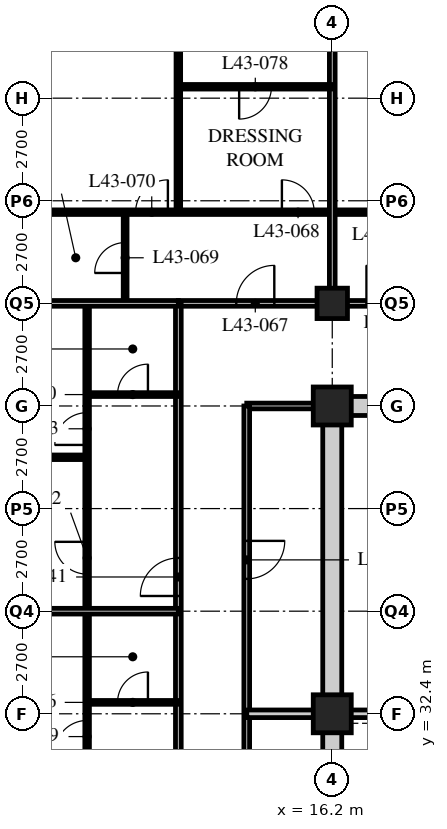
"""IFC4 building model, lengths in metres.
Left out: names, types, materials, properties, quantities, classifications, styles, units other than length and angle.
Written with IfcOpenShell. Run it as: python <this file> out.ifc"""

import sys

from ifc_helpers import new_model, si_unit, direction, frame, frame_2d, origin, origin_2d, place, context, subcontext, project, spatial, rectangle, hollow_rectangle, extrude, element, fill, save


model = new_model("IFC4")
c1 = context("Model", 3, precision=1e-05, world=origin(), true_north=direction((0.0, 1.0)))
c2 = subcontext(c1, "Body", "Model", "MODEL_VIEW")
j1 = project(units=[si_unit("LENGTHUNIT", "METRE"), si_unit("PLANEANGLEUNIT", "RADIAN")], contexts=[c1])
p1 = place(None, origin())
s1 = spatial("IfcSite", under=j1, at=p1, CompositionType="ELEMENT")
p2 = place(p1, origin())
s2 = spatial("IfcBuilding", under=s1, at=p2, CompositionType="ELEMENT")
p3 = place(p2, frame((0.0, 0.0, 170.4)))
s3 = spatial("IfcBuildingStorey", under=s2, at=p3, CompositionType="ELEMENT", Elevation=170.4)
for number, where, z_axis, x_axis in (
    (1, (16.2, 32.4, 0.0), (0.0, 0.0, 1.0), (1.0, 0.0, 0.0)),
    (2, (16.2, 40.5, 0.0), (0.0, 0.0, 1.0), (1.0, 0.0, 0.0)),
):
    element("IfcColumn", number, at=place(p3, frame(where, z_axis=z_axis, x_axis=x_axis)), inside=s3, PredefinedType="COLUMN", context=c2, shape_type="SweptSolid", body=[
        extrude(hollow_rectangle(XDim=1.0, YDim=1.0, WallThickness=0.1, at=origin_2d()), origin(), (0.0, 0.0, 1.0), 3.6),
    ])
p4 = place(p3, frame((16.2, 43.2, 0.0), z_axis=(0.0, 0.0, 1.0), x_axis=(1.0, 0.0, 0.0)))
e3 = element("IfcColumn", 3, at=p4, inside=s3, PredefinedType="COLUMN", context=c2, shape_type="SweptSolid", body=[
    extrude(hollow_rectangle(XDim=0.8, YDim=0.8, WallThickness=0.08, at=origin_2d()), origin(), (0.0, 0.0, 1.0), 3.6),
])
p5 = place(p3, frame((12.15, 43.2, 0.0), z_axis=(0.0, 0.0, 1.0), x_axis=(1.0, 0.0, 0.0)))
e4 = element("IfcWall", 4, at=p5, inside=s3, PredefinedType="PARTITIONING", context=c2, shape_type="SweptSolid", body=[
    extrude(rectangle(XDim=32.4, YDim=0.15, at=frame_2d((16.2, 0.0))), origin(), (0.0, 0.0, 1.0), 2.778),
])
p6 = place(p5, frame((4.95, 0.0, 0.0)))
e5 = element("IfcOpeningElement", 5, at=p6, cuts=e4, PredefinedType="OPENING", context=c2, shape_type="SweptSolid", body=[
    extrude(rectangle(XDim=1.0, YDim=2.1, at=frame_2d((0.5, 1.05))), frame((0.0, 0.085, 0.0), z_axis=(0.0, -1.0, 0.0), x_axis=(1.0, 0.0, 0.0)), (0.0, 0.0, 1.0), 0.17),
])
p7 = place(p5, frame((13.05, 0.0, 0.0)))
e6 = element("IfcOpeningElement", 6, at=p7, cuts=e4, PredefinedType="OPENING", context=c2, shape_type="SweptSolid", body=[
    extrude(rectangle(XDim=1.0, YDim=2.1, at=frame_2d((0.5, 1.05))), frame((0.0, 0.085, 0.0), z_axis=(0.0, -1.0, 0.0), x_axis=(1.0, 0.0, 0.0)), (0.0, 0.0, 1.0), 0.17),
])
p8 = place(p5, frame((21.15, 0.0, 0.0)))
e7 = element("IfcOpeningElement", 7, at=p8, cuts=e4, PredefinedType="OPENING", context=c2, shape_type="SweptSolid", body=[
    extrude(rectangle(XDim=1.0, YDim=2.1, at=frame_2d((0.5, 1.05))), frame((0.0, 0.085, 0.0), z_axis=(0.0, -1.0, 0.0), x_axis=(1.0, 0.0, 0.0)), (0.0, 0.0, 1.0), 0.17),
])
p9 = place(p5, frame((29.875, 0.0, 0.0)))
e8 = element("IfcOpeningElement", 8, at=p9, cuts=e4, PredefinedType="OPENING", context=c2, shape_type="SweptSolid", body=[
    extrude(rectangle(XDim=1.0, YDim=2.1, at=frame_2d((0.5, 1.05))), frame((0.0, 0.085, 0.0), z_axis=(0.0, -1.0, 0.0), x_axis=(1.0, 0.0, 0.0)), (0.0, 0.0, 1.0), 0.17),
])
p10 = place(p5, frame((1.525, 0.0, 0.0)))
e9 = element("IfcOpeningElement", 9, at=p10, cuts=e4, PredefinedType="OPENING", context=c2, shape_type="SweptSolid", body=[
    extrude(rectangle(XDim=1.0, YDim=2.1, at=frame_2d((0.5, 1.05))), frame((0.0, 0.085, 0.0), z_axis=(0.0, -1.0, 0.0), x_axis=(1.0, 0.0, 0.0)), (0.0, 0.0, 1.0), 0.17),
])
p11 = place(p3, frame((12.15, 18.9, 0.0), z_axis=(0.0, 0.0, 1.0), x_axis=(0.0, 1.0, 0.0)))
e10 = element("IfcWall", 10, at=p11, inside=s3, PredefinedType="PARTITIONING", context=c2, shape_type="SweptSolid", body=[
    extrude(rectangle(XDim=24.3, YDim=0.15, at=frame_2d((12.15, 0.0))), origin(), (0.0, 0.0, 1.0), 3.39),
])
p12 = place(p11, frame((2.35, 0.0, 0.0)))
e11 = element("IfcOpeningElement", 11, at=p12, cuts=e10, PredefinedType="OPENING", context=c2, shape_type="SweptSolid", body=[
    extrude(rectangle(XDim=1.0, YDim=2.1, at=frame_2d((0.5, 1.05))), frame((0.0, 0.085, 0.0), z_axis=(0.0, -1.0, 0.0), x_axis=(1.0, 0.0, 0.0)), (0.0, 0.0, 1.0), 0.17),
])
p13 = place(p11, frame((6.4, 0.0, 0.0)))
e12 = element("IfcOpeningElement", 12, at=p13, cuts=e10, PredefinedType="OPENING", context=c2, shape_type="SweptSolid", body=[
    extrude(rectangle(XDim=1.0, YDim=2.1, at=frame_2d((0.5, 1.05))), frame((0.0, 0.085, 0.0), z_axis=(0.0, -1.0, 0.0), x_axis=(1.0, 0.0, 0.0)), (0.0, 0.0, 1.0), 0.17),
])
p14 = place(p11, frame((8.5, 0.0, 0.0)))
e13 = element("IfcOpeningElement", 13, at=p14, cuts=e10, PredefinedType="OPENING", context=c2, shape_type="SweptSolid", body=[
    extrude(rectangle(XDim=1.0, YDim=2.1, at=frame_2d((0.5, 1.05))), frame((0.0, 0.085, 0.0), z_axis=(0.0, -1.0, 0.0), x_axis=(1.0, 0.0, 0.0)), (0.0, 0.0, 1.0), 0.17),
])
p15 = place(p11, frame((16.6, 0.0, 0.0)))
e14 = element("IfcOpeningElement", 14, at=p15, cuts=e10, PredefinedType="OPENING", context=c2, shape_type="SweptSolid", body=[
    extrude(rectangle(XDim=1.0, YDim=2.1, at=frame_2d((0.5, 1.05))), frame((0.0, 0.085, 0.0), z_axis=(0.0, -1.0, 0.0), x_axis=(1.0, 0.0, 0.0)), (0.0, 0.0, 1.0), 0.17),
])
p16 = place(p3, frame((16.0, 40.5, 0.0), z_axis=(0.0, 0.0, 1.0), x_axis=(-1.0, 0.0, 0.0)))
e15 = element("IfcWall", 15, at=p16, inside=s3, PredefinedType="PARTITIONING", context=c2, shape_type="SweptSolid", body=[
    extrude(rectangle(XDim=2.05, YDim=0.15, at=frame_2d((1.025, 0.0))), origin(), (0.0, 0.0, 1.0), 3.39),
])
p17 = place(p3, frame((13.95, 40.5, 0.0), z_axis=(0.0, 0.0, 1.0), x_axis=(0.0, -1.0, 0.0)))
e16 = element("IfcWall", 16, at=p17, inside=s3, PredefinedType="PARTITIONING", context=c2, shape_type="SweptSolid", body=[
    extrude(rectangle(XDim=19.8, YDim=0.15, at=frame_2d((9.9, 0.0))), origin(), (0.0, 0.0, 1.0), 3.39),
])
p18 = place(p17, frame((11.65, 0.0, 0.0)))
e17 = element("IfcOpeningElement", 17, at=p18, cuts=e16, PredefinedType="OPENING", context=c2, shape_type="SweptSolid", body=[
    extrude(rectangle(XDim=1.0, YDim=2.1, at=frame_2d((0.5, 1.05))), frame((0.0, 0.085, 0.0), z_axis=(0.0, -1.0, 0.0), x_axis=(1.0, 0.0, 0.0)), (0.0, 0.0, 1.0), 0.17),
])
p19 = place(p17, frame((3.55, 0.0, 0.0)))
e18 = element("IfcOpeningElement", 18, at=p19, cuts=e16, PredefinedType="OPENING", context=c2, shape_type="SweptSolid", body=[
    extrude(rectangle(XDim=1.0, YDim=2.1, at=frame_2d((0.5, 1.05))), frame((0.0, 0.085, 0.0), z_axis=(0.0, -1.0, 0.0), x_axis=(1.0, 0.0, 0.0)), (0.0, 0.0, 1.0), 0.17),
])
p20 = place(p3, frame((13.95, 32.4, 0.0), z_axis=(0.0, 0.0, 1.0), x_axis=(1.0, 0.0, 0.0)))
e19 = element("IfcWall", 19, at=p20, inside=s3, PredefinedType="SOLIDWALL", context=c2, shape_type="SweptSolid", body=[
    extrude(rectangle(XDim=2.25, YDim=0.2, at=frame_2d((1.125, 0.0))), origin(), (0.0, 0.0, 1.0), 3.39),
])
p21 = place(p3, frame((9.75, 27.0, 0.0), z_axis=(0.0, 0.0, 1.0), x_axis=(0.0, 1.0, 0.0)))
e20 = element("IfcWall", 20, at=p21, inside=s3, PredefinedType="PARTITIONING", context=c2, shape_type="SweptSolid", body=[
    extrude(rectangle(XDim=16.2, YDim=0.12, at=frame_2d((8.1, 0.0))), origin(), (0.0, 0.0, 1.0), 3.39),
])
p22 = place(p21, frame((0.975, 0.0, 0.0)))
e21 = element("IfcOpeningElement", 21, at=p22, cuts=e20, PredefinedType="OPENING", context=c2, shape_type="SweptSolid", body=[
    extrude(rectangle(XDim=0.85, YDim=2.1, at=frame_2d((0.425, 1.05))), frame((0.0, 0.07, 0.0), z_axis=(0.0, -1.0, 0.0), x_axis=(1.0, 0.0, 0.0)), (0.0, 0.0, 1.0), 0.14),
])
p23 = place(p21, frame((4.375, 0.0, 0.0)))
e22 = element("IfcOpeningElement", 22, at=p23, cuts=e20, PredefinedType="OPENING", context=c2, shape_type="SweptSolid", body=[
    extrude(rectangle(XDim=0.85, YDim=2.1, at=frame_2d((0.425, 1.05))), frame((0.0, 0.07, 0.0), z_axis=(0.0, -1.0, 0.0), x_axis=(1.0, 0.0, 0.0)), (0.0, 0.0, 1.0), 0.14),
])
p24 = place(p21, frame((9.075, 0.0, 0.0)))
e23 = element("IfcOpeningElement", 23, at=p24, cuts=e20, PredefinedType="OPENING", context=c2, shape_type="SweptSolid", body=[
    extrude(rectangle(XDim=0.85, YDim=2.1, at=frame_2d((0.425, 1.05))), frame((0.0, 0.07, 0.0), z_axis=(0.0, -1.0, 0.0), x_axis=(1.0, 0.0, 0.0)), (0.0, 0.0, 1.0), 0.14),
])
p25 = place(p21, frame((12.475, 0.0, 0.0)))
e24 = element("IfcOpeningElement", 24, at=p25, cuts=e20, PredefinedType="OPENING", context=c2, shape_type="SweptSolid", body=[
    extrude(rectangle(XDim=0.85, YDim=2.1, at=frame_2d((0.425, 1.05))), frame((0.0, 0.07, 0.0), z_axis=(0.0, -1.0, 0.0), x_axis=(1.0, 0.0, 0.0)), (0.0, 0.0, 1.0), 0.14),
])
p26 = place(p3, frame((12.15, 32.7, 0.0), z_axis=(0.0, 0.0, 1.0), x_axis=(-1.0, 0.0, 0.0)))
e25 = element("IfcWall", 25, at=p26, inside=s3, PredefinedType="PARTITIONING", context=c2, shape_type="SweptSolid", body=[
    extrude(rectangle(XDim=2.4, YDim=0.1, at=frame_2d((1.2, 0.0))), origin(), (0.0, 0.0, 1.0), 3.39),
])
p27 = place(p26, frame((0.8, 0.0, 0.0)))
e26 = element("IfcOpeningElement", 26, at=p27, cuts=e25, PredefinedType="OPENING", context=c2, shape_type="SweptSolid", body=[
    extrude(rectangle(XDim=0.8, YDim=2.1, at=frame_2d((0.4, 1.05))), frame((0.0, 0.06, 0.0), z_axis=(0.0, -1.0, 0.0), x_axis=(1.0, 0.0, 0.0)), (0.0, 0.0, 1.0), 0.12),
])
p28 = place(p3, frame((12.15, 35.1, 0.0), z_axis=(0.0, 0.0, 1.0), x_axis=(-1.0, 0.0, 0.0)))
e27 = element("IfcWall", 27, at=p28, inside=s3, PredefinedType="PARTITIONING", context=c2, shape_type="SweptSolid", body=[
    extrude(rectangle(XDim=11.85, YDim=0.15, at=frame_2d((5.925, 0.0))), origin(), (0.0, 0.0, 1.0), 2.778),
])
p29 = place(p3, frame((12.15, 40.8, 0.0), z_axis=(0.0, 0.0, 1.0), x_axis=(-1.0, 0.0, 0.0)))
e28 = element("IfcWall", 28, at=p29, inside=s3, PredefinedType="PARTITIONING", context=c2, shape_type="SweptSolid", body=[
    extrude(rectangle(XDim=2.4, YDim=0.1, at=frame_2d((1.2, 0.0))), origin(), (0.0, 0.0, 1.0), 3.39),
])
p30 = place(p29, frame((0.8, 0.0, 0.0)))
e29 = element("IfcOpeningElement", 29, at=p30, cuts=e28, PredefinedType="OPENING", context=c2, shape_type="SweptSolid", body=[
    extrude(rectangle(XDim=0.8, YDim=2.1, at=frame_2d((0.4, 1.05))), frame((0.0, 0.06, 0.0), z_axis=(0.0, -1.0, 0.0), x_axis=(1.0, 0.0, 0.0)), (0.0, 0.0, 1.0), 0.12),
])
p31 = place(p3, frame((9.75, 39.15, 0.0), z_axis=(0.0, 0.0, 1.0), x_axis=(-1.0, 0.0, 0.0)))
e30 = element("IfcWall", 30, at=p31, inside=s3, PredefinedType="PARTITIONING", context=c2, shape_type="SweptSolid", body=[
    extrude(rectangle(XDim=9.45, YDim=0.12, at=frame_2d((4.725, 0.0))), origin(), (0.0, 0.0, 1.0), 3.39),
])
p32 = place(p3, frame((10.75, 43.2, 0.0), z_axis=(0.0, 0.0, 1.0), x_axis=(0.0, 1.0, 0.0)))
e31 = element("IfcWall", 31, at=p32, inside=s3, PredefinedType="PARTITIONING", context=c2, shape_type="SweptSolid", body=[
    extrude(rectangle(XDim=2.4, YDim=0.1, at=frame_2d((1.2, 0.0))), origin(), (0.0, 0.0, 1.0), 3.39),
])
p33 = place(p32, frame((0.8, 0.0, 0.0)))
e32 = element("IfcOpeningElement", 32, at=p33, cuts=e31, PredefinedType="OPENING", context=c2, shape_type="SweptSolid", body=[
    extrude(rectangle(XDim=0.8, YDim=2.1, at=frame_2d((0.4, 1.05))), frame((0.0, 0.06, 0.0), z_axis=(0.0, -1.0, 0.0), x_axis=(1.0, 0.0, 0.0)), (0.0, 0.0, 1.0), 0.12),
])
p34 = place(p3, frame((8.15, 45.6, 0.0), z_axis=(0.0, 0.0, 1.0), x_axis=(1.0, 0.0, 0.0)))
e33 = element("IfcWall", 33, at=p34, inside=s3, PredefinedType="PARTITIONING", context=c2, shape_type="SweptSolid", body=[
    extrude(rectangle(XDim=40.4, YDim=0.12, at=frame_2d((20.2, 0.0))), origin(), (0.0, 0.0, 1.0), 3.39),
])
p35 = place(p34, frame((9.025, 0.0, 0.0)))
e34 = element("IfcOpeningElement", 34, at=p35, cuts=e33, PredefinedType="OPENING", context=c2, shape_type="SweptSolid", body=[
    extrude(rectangle(XDim=0.85, YDim=2.1, at=frame_2d((0.425, 1.05))), frame((0.0, 0.07, 0.0), z_axis=(0.0, -1.0, 0.0), x_axis=(1.0, 0.0, 0.0)), (0.0, 0.0, 1.0), 0.14),
])
p36 = place(p34, frame((12.425, 0.0, 0.0)))
e35 = element("IfcOpeningElement", 35, at=p36, cuts=e33, PredefinedType="OPENING", context=c2, shape_type="SweptSolid", body=[
    extrude(rectangle(XDim=0.85, YDim=2.1, at=frame_2d((0.425, 1.05))), frame((0.0, 0.07, 0.0), z_axis=(0.0, -1.0, 0.0), x_axis=(1.0, 0.0, 0.0)), (0.0, 0.0, 1.0), 0.14),
])
p37 = place(p34, frame((17.125, 0.0, 0.0)))
e36 = element("IfcOpeningElement", 36, at=p37, cuts=e33, PredefinedType="OPENING", context=c2, shape_type="SweptSolid", body=[
    extrude(rectangle(XDim=0.85, YDim=2.1, at=frame_2d((0.425, 1.05))), frame((0.0, 0.07, 0.0), z_axis=(0.0, -1.0, 0.0), x_axis=(1.0, 0.0, 0.0)), (0.0, 0.0, 1.0), 0.14),
])
p38 = place(p34, frame((20.525, 0.0, 0.0)))
e37 = element("IfcOpeningElement", 37, at=p38, cuts=e33, PredefinedType="OPENING", context=c2, shape_type="SweptSolid", body=[
    extrude(rectangle(XDim=0.85, YDim=2.1, at=frame_2d((0.425, 1.05))), frame((0.0, 0.07, 0.0), z_axis=(0.0, -1.0, 0.0), x_axis=(1.0, 0.0, 0.0)), (0.0, 0.0, 1.0), 0.14),
])
p39 = place(p34, frame((25.225, 0.0, 0.0)))
e38 = element("IfcOpeningElement", 38, at=p39, cuts=e33, PredefinedType="OPENING", context=c2, shape_type="SweptSolid", body=[
    extrude(rectangle(XDim=0.85, YDim=2.1, at=frame_2d((0.425, 1.05))), frame((0.0, 0.07, 0.0), z_axis=(0.0, -1.0, 0.0), x_axis=(1.0, 0.0, 0.0)), (0.0, 0.0, 1.0), 0.14),
])
p40 = place(p34, frame((28.625, 0.0, 0.0)))
e39 = element("IfcOpeningElement", 39, at=p40, cuts=e33, PredefinedType="OPENING", context=c2, shape_type="SweptSolid", body=[
    extrude(rectangle(XDim=0.85, YDim=2.1, at=frame_2d((0.425, 1.05))), frame((0.0, 0.07, 0.0), z_axis=(0.0, -1.0, 0.0), x_axis=(1.0, 0.0, 0.0)), (0.0, 0.0, 1.0), 0.14),
])
p41 = place(p34, frame((32.825, 0.0, 0.0)))
e40 = element("IfcOpeningElement", 40, at=p41, cuts=e33, PredefinedType="OPENING", context=c2, shape_type="SweptSolid", body=[
    extrude(rectangle(XDim=0.85, YDim=2.1, at=frame_2d((0.425, 1.05))), frame((0.0, 0.07, 0.0), z_axis=(0.0, -1.0, 0.0), x_axis=(1.0, 0.0, 0.0)), (0.0, 0.0, 1.0), 0.14),
])
p42 = place(p34, frame((36.675, 0.0, 0.0)))
e41 = element("IfcOpeningElement", 41, at=p42, cuts=e33, PredefinedType="OPENING", context=c2, shape_type="SweptSolid", body=[
    extrude(rectangle(XDim=0.85, YDim=2.1, at=frame_2d((0.425, 1.05))), frame((0.0, 0.07, 0.0), z_axis=(0.0, -1.0, 0.0), x_axis=(1.0, 0.0, 0.0)), (0.0, 0.0, 1.0), 0.14),
])
p43 = place(p34, frame((6.725, 0.0, 0.0)))
e42 = element("IfcOpeningElement", 42, at=p43, cuts=e33, PredefinedType="OPENING", context=c2, shape_type="SweptSolid", body=[
    extrude(rectangle(XDim=0.85, YDim=2.1, at=frame_2d((0.425, 1.05))), frame((0.0, 0.07, 0.0), z_axis=(0.0, -1.0, 0.0), x_axis=(1.0, 0.0, 0.0)), (0.0, 0.0, 1.0), 0.14),
])
p44 = place(p34, frame((2.875, 0.0, 0.0)))
e43 = element("IfcOpeningElement", 43, at=p44, cuts=e33, PredefinedType="OPENING", context=c2, shape_type="SweptSolid", body=[
    extrude(rectangle(XDim=0.85, YDim=2.1, at=frame_2d((0.425, 1.05))), frame((0.0, 0.07, 0.0), z_axis=(0.0, -1.0, 0.0), x_axis=(1.0, 0.0, 0.0)), (0.0, 0.0, 1.0), 0.14),
])
p45 = place(p3, frame((12.15, 45.6, 0.0), z_axis=(0.0, 0.0, 1.0), x_axis=(0.0, 1.0, 0.0)))
e44 = element("IfcWall", 44, at=p45, inside=s3, PredefinedType="PARTITIONING", context=c2, shape_type="SweptSolid", body=[
    extrude(rectangle(XDim=13.5, YDim=0.12, at=frame_2d((6.75, 0.0))), origin(), (0.0, 0.0, 1.0), 3.39),
])
p46 = place(p3, frame((0.3, 43.2, 0.0), z_axis=(0.0, 0.0, 1.0), x_axis=(1.0, 0.0, 0.0)))
e45 = element("IfcWall", 45, at=p46, inside=s3, PredefinedType="PARTITIONING", context=c2, shape_type="SweptSolid", body=[
    extrude(rectangle(XDim=11.85, YDim=0.15, at=frame_2d((5.925, 0.0))), origin(), (0.0, 0.0, 1.0), 2.778),
])
p47 = place(p3, frame((16.2, 43.2, 0.0), z_axis=(0.0, 0.0, 1.0), x_axis=(0.0, 1.0, 0.0)))
e46 = element("IfcWall", 46, at=p47, inside=s3, PredefinedType="PARTITIONING", context=c2, shape_type="SweptSolid", body=[
    extrude(rectangle(XDim=15.9, YDim=0.15, at=frame_2d((7.95, 0.0))), origin(), (0.0, 0.0, 1.0), 2.778),
])
p48 = place(p3, frame((12.15, 48.9, 0.0), z_axis=(0.0, 0.0, 1.0), x_axis=(1.0, 0.0, 0.0)))
e47 = element("IfcWall", 47, at=p48, inside=s3, PredefinedType="PARTITIONING", context=c2, shape_type="SweptSolid", body=[
    extrude(rectangle(XDim=4.05, YDim=0.12, at=frame_2d((2.025, 0.0))), origin(), (0.0, 0.0, 1.0), 3.39),
])
p49 = place(p48, frame((1.6, 0.0, 0.0)))
e48 = element("IfcOpeningElement", 48, at=p49, cuts=e47, PredefinedType="OPENING", context=c2, shape_type="SweptSolid", body=[
    extrude(rectangle(XDim=0.85, YDim=2.1, at=frame_2d((0.425, 1.05))), frame((0.0, 0.07, 0.0), z_axis=(0.0, -1.0, 0.0), x_axis=(1.0, 0.0, 0.0)), (0.0, 0.0, 1.0), 0.14),
])
p50 = place(p3, frame((15.95, 40.5, 0.0), z_axis=(0.0, 0.0, 1.0), x_axis=(1.0, 0.0, 0.0)))
e49 = element("IfcWall", 49, at=p50, inside=s3, PredefinedType="SOLIDWALL", context=c2, shape_type="SweptSolid", body=[
    extrude(rectangle(XDim=24.8, YDim=0.5, at=frame_2d((12.4, 0.0))), origin(), (0.0, 0.0, 1.0), 2.74),
])
p51 = place(p50, frame((11.5, 0.0, 0.0)))
e50 = element("IfcOpeningElement", 50, at=p51, cuts=e49, PredefinedType="OPENING", context=c2, shape_type="SweptSolid", body=[
    extrude(rectangle(XDim=1.8, YDim=2.4, at=frame_2d((0.9, 1.2))), frame((0.0, 0.26, 0.0), z_axis=(0.0, -1.0, 0.0), x_axis=(1.0, 0.0, 0.0)), (0.0, 0.0, 1.0), 0.52),
])
p52 = place(p3, frame((16.2, 24.55, 0.0), z_axis=(0.0, 0.0, 1.0), x_axis=(0.0, 1.0, 0.0)))
e51 = element("IfcWall", 51, at=p52, inside=s3, PredefinedType="SOLIDWALL", context=c2, shape_type="SweptSolid", body=[
    extrude(rectangle(XDim=15.7, YDim=0.5, at=frame_2d((7.85, 0.0))), origin(), (0.0, 0.0, 1.0), 2.778),
])
p53 = place(p3, frame((16.45, 32.4, 0.0), z_axis=(0.0, 0.0, 1.0), x_axis=(1.0, 0.0, 0.0)))
e52 = element("IfcWall", 52, at=p53, inside=s3, PredefinedType="SOLIDWALL", context=c2, shape_type="SweptSolid", body=[
    extrude(rectangle(XDim=7.95, YDim=0.2, at=frame_2d((3.975, 0.0))), origin(), (0.0, 0.0, 1.0), 2.778),
])
p54 = place(p19, origin())
e53 = element("IfcDoor", 53, at=p54, inside=s3, OperationType="SINGLE_SWING_LEFT", PredefinedType="DOOR", context=c2, shape_type="SweptSolid", body=[
    extrude(rectangle(XDim=1.0, YDim=2.1, at=frame_2d((0.5, 1.05))), frame((0.0, 0.025, 0.0), z_axis=(0.0, -1.0, 0.0), x_axis=(1.0, 0.0, 0.0)), (0.0, 0.0, 1.0), 0.05),
])
fill(e18, e53)
p55 = place(p6, origin())
e54 = element("IfcDoor", 54, at=p55, inside=s3, OperationType="SINGLE_SWING_LEFT", PredefinedType="DOOR", context=c2, shape_type="SweptSolid", body=[
    extrude(rectangle(XDim=1.0, YDim=2.1, at=frame_2d((0.5, 1.05))), frame((0.0, 0.025, 0.0), z_axis=(0.0, -1.0, 0.0), x_axis=(1.0, 0.0, 0.0)), (0.0, 0.0, 1.0), 0.05),
])
fill(e5, e54)
p56 = place(p27, origin())
e55 = element("IfcDoor", 55, at=p56, inside=s3, OperationType="SINGLE_SWING_RIGHT", PredefinedType="DOOR", context=c2, shape_type="SweptSolid", body=[
    extrude(rectangle(XDim=0.8, YDim=2.1, at=frame_2d((0.4, 1.05))), frame((0.0, 0.025, 0.0), z_axis=(0.0, -1.0, 0.0), x_axis=(1.0, 0.0, 0.0)), (0.0, 0.0, 1.0), 0.05),
])
fill(e26, e55)
p57 = place(p23, origin())
e56 = element("IfcDoor", 56, at=p57, inside=s3, OperationType="SINGLE_SWING_LEFT", PredefinedType="DOOR", context=c2, shape_type="SweptSolid", body=[
    extrude(rectangle(XDim=0.85, YDim=2.1, at=frame_2d((0.425, 1.05))), frame((0.0, 0.025, 0.0), z_axis=(0.0, -1.0, 0.0), x_axis=(1.0, 0.0, 0.0)), (0.0, 0.0, 1.0), 0.05),
])
fill(e22, e56)
p58 = place(p30, origin())
e57 = element("IfcDoor", 57, at=p58, inside=s3, OperationType="SINGLE_SWING_RIGHT", PredefinedType="DOOR", context=c2, shape_type="SweptSolid", body=[
    extrude(rectangle(XDim=0.8, YDim=2.1, at=frame_2d((0.4, 1.05))), frame((0.0, 0.025, 0.0), z_axis=(0.0, -1.0, 0.0), x_axis=(1.0, 0.0, 0.0)), (0.0, 0.0, 1.0), 0.05),
])
fill(e29, e57)
p59 = place(p15, origin())
e58 = element("IfcDoor", 58, at=p59, inside=s3, OperationType="SINGLE_SWING_LEFT", PredefinedType="DOOR", context=c2, shape_type="SweptSolid", body=[
    extrude(rectangle(XDim=1.0, YDim=2.1, at=frame_2d((0.5, 1.05))), frame((0.0, 0.025, 0.0), z_axis=(0.0, -1.0, 0.0), x_axis=(1.0, 0.0, 0.0)), (0.0, 0.0, 1.0), 0.05),
])
fill(e14, e58)
p60 = place(p24, origin())
e59 = element("IfcDoor", 59, at=p60, inside=s3, OperationType="SINGLE_SWING_RIGHT", PredefinedType="DOOR", context=c2, shape_type="SweptSolid", body=[
    extrude(rectangle(XDim=0.85, YDim=2.1, at=frame_2d((0.425, 1.05))), frame((0.0, 0.025, 0.0), z_axis=(0.0, -1.0, 0.0), x_axis=(1.0, 0.0, 0.0)), (0.0, 0.0, 1.0), 0.05),
])
fill(e23, e59)
p61 = place(p25, origin())
e60 = element("IfcDoor", 60, at=p61, inside=s3, OperationType="SINGLE_SWING_LEFT", PredefinedType="DOOR", context=c2, shape_type="SweptSolid", body=[
    extrude(rectangle(XDim=0.85, YDim=2.1, at=frame_2d((0.425, 1.05))), frame((0.0, 0.025, 0.0), z_axis=(0.0, -1.0, 0.0), x_axis=(1.0, 0.0, 0.0)), (0.0, 0.0, 1.0), 0.05),
])
fill(e24, e60)
p62 = place(p10, origin())
e61 = element("IfcDoor", 61, at=p62, inside=s3, OperationType="SINGLE_SWING_RIGHT", PredefinedType="DOOR", context=c2, shape_type="SweptSolid", body=[
    extrude(rectangle(XDim=1.0, YDim=2.1, at=frame_2d((0.5, 1.05))), frame((0.0, 0.025, 0.0), z_axis=(0.0, -1.0, 0.0), x_axis=(1.0, 0.0, 0.0)), (0.0, 0.0, 1.0), 0.05),
])
fill(e9, e61)
p63 = place(p43, origin())
e62 = element("IfcDoor", 62, at=p63, inside=s3, OperationType="SINGLE_SWING_LEFT", PredefinedType="DOOR", context=c2, shape_type="SweptSolid", body=[
    extrude(rectangle(XDim=0.85, YDim=2.1, at=frame_2d((0.425, 1.05))), frame((0.0, 0.025, 0.0), z_axis=(0.0, -1.0, 0.0), x_axis=(1.0, 0.0, 0.0)), (0.0, 0.0, 1.0), 0.05),
])
fill(e42, e62)
p64 = place(p33, origin())
e63 = element("IfcDoor", 63, at=p64, inside=s3, OperationType="SINGLE_SWING_LEFT", PredefinedType="DOOR", context=c2, shape_type="SweptSolid", body=[
    extrude(rectangle(XDim=0.8, YDim=2.1, at=frame_2d((0.4, 1.05))), frame((0.0, 0.025, 0.0), z_axis=(0.0, -1.0, 0.0), x_axis=(1.0, 0.0, 0.0)), (0.0, 0.0, 1.0), 0.05),
])
fill(e32, e63)
p65 = place(p44, origin())
e64 = element("IfcDoor", 64, at=p65, inside=s3, OperationType="SINGLE_SWING_RIGHT", PredefinedType="DOOR", context=c2, shape_type="SweptSolid", body=[
    extrude(rectangle(XDim=0.85, YDim=2.1, at=frame_2d((0.425, 1.05))), frame((0.0, 0.025, 0.0), z_axis=(0.0, -1.0, 0.0), x_axis=(1.0, 0.0, 0.0)), (0.0, 0.0, 1.0), 0.05),
])
fill(e43, e64)
p66 = place(p49, origin())
e65 = element("IfcDoor", 65, at=p66, inside=s3, OperationType="SINGLE_SWING_RIGHT", PredefinedType="DOOR", context=c2, shape_type="SweptSolid", body=[
    extrude(rectangle(XDim=0.85, YDim=2.1, at=frame_2d((0.425, 1.05))), frame((0.0, 0.025, 0.0), z_axis=(0.0, -1.0, 0.0), x_axis=(1.0, 0.0, 0.0)), (0.0, 0.0, 1.0), 0.05),
])
fill(e48, e65)
save(model, sys.argv[1])
